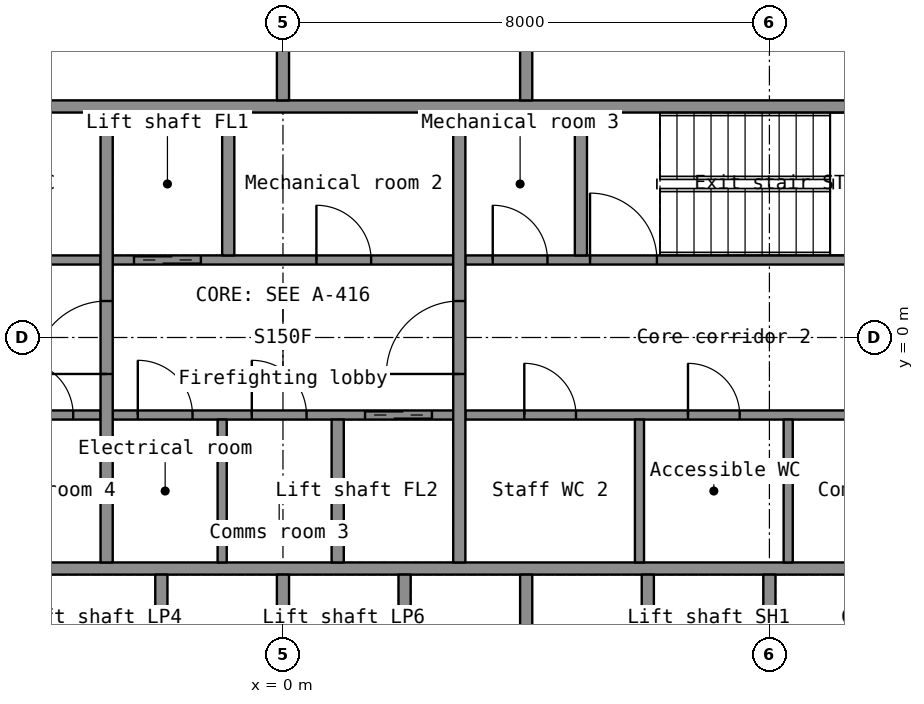
"""IFC4 building model, lengths in metres.
Left out: names, types, materials, properties, quantities, classifications, styles, units other than length and angle.
Written with IfcOpenShell. Run it as: python <this file> out.ifc"""

import sys

from ifc_helpers import new_model, si_unit, direction, frame, frame_2d, origin, place, context, subcontext, project, spatial, rectangle, extrude, element, fill, save


model = new_model("IFC4")
c1 = context("Model", 3, precision=1e-05, world=origin(), true_north=direction((0.0, 1.0)))
c2 = subcontext(c1, "Body", "Model", "MODEL_VIEW")
j1 = project(units=[si_unit("LENGTHUNIT", "METRE"), si_unit("PLANEANGLEUNIT", "RADIAN")], contexts=[c1])
p1 = place(None, origin())
s1 = spatial("IfcSite", under=j1, at=p1, CompositionType="ELEMENT")
p2 = place(p1, origin())
s2 = spatial("IfcBuilding", under=s1, at=p2, CompositionType="ELEMENT")
p3 = place(p2, frame((0.0, 0.0, 108.2)))
s3 = spatial("IfcBuildingStorey", under=s2, at=p3, CompositionType="ELEMENT", Elevation=108.2)
for number, where, z_axis, x_axis in (
    (1, (-11.5, -3.8, 0.0), (0.0, 0.0, 1.0), (1.0, 0.0, 0.0)),
    (2, (-11.5, 3.8, 0.0), (0.0, 0.0, 1.0), (1.0, 0.0, 0.0)),
):
    element("IfcWall", number, at=place(p3, frame(where, z_axis=z_axis, x_axis=x_axis)), inside=s3, PredefinedType="SHEAR", context=c2, shape_type="SweptSolid", body=[
        extrude(rectangle(XDim=23.0, YDim=0.2, at=frame_2d((11.5, 0.0))), origin(), (0.0, 0.0, 1.0), 3.3),
    ])
for number, where, z_axis, x_axis in (
    (3, (-2.0, -6.7, 0.0), (0.0, 0.0, 1.0), (0.0, 1.0, 0.0)),
    (4, (0.0, -6.7, 0.0), (0.0, 0.0, 1.0), (0.0, 1.0, 0.0)),
    (5, (2.0, -6.7, 0.0), (0.0, 0.0, 1.0), (0.0, 1.0, 0.0)),
    (6, (4.0, -6.7, 0.0), (0.0, 0.0, 1.0), (0.0, 1.0, 0.0)),
    (7, (6.0, -6.7, 0.0), (0.0, 0.0, 1.0), (0.0, 1.0, 0.0)),
    (8, (8.0, -6.7, 0.0), (0.0, 0.0, 1.0), (0.0, 1.0, 0.0)),
):
    element("IfcWall", number, at=place(p3, frame(where, z_axis=z_axis, x_axis=x_axis)), inside=s3, PredefinedType="SHEAR", context=c2, shape_type="SweptSolid", body=[
        extrude(rectangle(XDim=2.8, YDim=0.2, at=frame_2d((1.4, 0.0))), origin(), (0.0, 0.0, 1.0), 3.3),
    ])
for number, where, z_axis, x_axis in (
    (9, (0.0, 3.9, 0.0), (0.0, 0.0, 1.0), (0.0, 1.0, 0.0)),
    (10, (4.0, 3.9, 0.0), (0.0, 0.0, 1.0), (0.0, 1.0, 0.0)),
):
    element("IfcWall", number, at=place(p3, frame(where, z_axis=z_axis, x_axis=x_axis)), inside=s3, PredefinedType="PARTITIONING", context=c2, shape_type="SweptSolid", body=[
        extrude(rectangle(XDim=2.8, YDim=0.2, at=frame_2d((1.4, 0.0))), origin(), (0.0, 0.0, 1.0), 3.3),
    ])
p4 = place(p3, frame((-11.5, -1.275, 0.0), z_axis=(0.0, 0.0, 1.0), x_axis=(1.0, 0.0, 0.0)))
e11 = element("IfcWall", 11, at=p4, inside=s3, PredefinedType="SHEAR", context=c2, shape_type="SweptSolid", body=[
    extrude(rectangle(XDim=8.5, YDim=0.15, at=frame_2d((4.25, 0.0))), origin(), (0.0, 0.0, 1.0), 3.3),
])
p5 = place(p4, frame((5.35, 0.0, 0.0)))
e12 = element("IfcOpeningElement", 12, at=p5, cuts=e11, PredefinedType="OPENING", context=c2, shape_type="SweptSolid", body=[
    extrude(rectangle(XDim=1.1, YDim=2.15, at=frame_2d((0.55, 1.075))), frame((0.0, 0.085, 0.0), z_axis=(0.0, -1.0, 0.0), x_axis=(1.0, 0.0, 0.0)), (0.0, 0.0, 1.0), 0.17),
])
p6 = place(p4, frame((7.15, 0.0, 0.0)))
e13 = element("IfcOpeningElement", 13, at=p6, cuts=e11, PredefinedType="OPENING", context=c2, shape_type="SweptSolid", body=[
    extrude(rectangle(XDim=0.9, YDim=2.1, at=frame_2d((0.45, 1.05))), frame((0.0, 0.085, 0.0), z_axis=(0.0, -1.0, 0.0), x_axis=(1.0, 0.0, 0.0)), (0.0, 0.0, 1.0), 0.17),
])
p7 = place(p3, frame((-2.8, -1.275, 0.0), z_axis=(0.0, 0.0, 1.0), x_axis=(1.0, 0.0, 0.0)))
e14 = element("IfcWall", 14, at=p7, inside=s3, PredefinedType="SHEAR", context=c2, shape_type="SweptSolid", body=[
    extrude(rectangle(XDim=5.6, YDim=0.15, at=frame_2d((2.8, 0.0))), origin(), (0.0, 0.0, 1.0), 3.3),
])
p8 = place(p7, frame((4.15, 0.0, 0.0)))
e15 = element("IfcOpeningElement", 15, at=p8, cuts=e14, PredefinedType="OPENING", context=c2, shape_type="SweptSolid", body=[
    extrude(rectangle(XDim=1.1, YDim=2.2, at=frame_2d((0.55, 1.1))), frame((0.0, 0.085, 0.0), z_axis=(0.0, -1.0, 0.0), x_axis=(1.0, 0.0, 0.0)), (0.0, 0.0, 1.0), 0.17),
])
p9 = place(p7, frame((0.413, 0.0, 0.0)))
e16 = element("IfcOpeningElement", 16, at=p9, cuts=e14, PredefinedType="OPENING", context=c2, shape_type="SweptSolid", body=[
    extrude(rectangle(XDim=0.9, YDim=2.1, at=frame_2d((0.45, 1.05))), frame((0.0, 0.085, 0.0), z_axis=(0.0, -1.0, 0.0), x_axis=(1.0, 0.0, 0.0)), (0.0, 0.0, 1.0), 0.17),
])
p10 = place(p7, frame((2.288, 0.0, 0.0)))
e17 = element("IfcOpeningElement", 17, at=p10, cuts=e14, PredefinedType="OPENING", context=c2, shape_type="SweptSolid", body=[
    extrude(rectangle(XDim=0.9, YDim=2.1, at=frame_2d((0.45, 1.05))), frame((0.0, 0.085, 0.0), z_axis=(0.0, -1.0, 0.0), x_axis=(1.0, 0.0, 0.0)), (0.0, 0.0, 1.0), 0.17),
])
p11 = place(p3, frame((3.0, -1.275, 0.0), z_axis=(0.0, 0.0, 1.0), x_axis=(1.0, 0.0, 0.0)))
e18 = element("IfcWall", 18, at=p11, inside=s3, PredefinedType="PARTITIONING", context=c2, shape_type="SweptSolid", body=[
    extrude(rectangle(XDim=8.5, YDim=0.15, at=frame_2d((4.25, 0.0))), origin(), (0.0, 0.0, 1.0), 3.3),
])
p12 = place(p11, frame((0.969, 0.0, 0.0)))
e19 = element("IfcOpeningElement", 19, at=p12, cuts=e18, PredefinedType="OPENING", context=c2, shape_type="SweptSolid", body=[
    extrude(rectangle(XDim=0.85, YDim=2.1, at=frame_2d((0.425, 1.05))), frame((0.0, 0.085, 0.0), z_axis=(0.0, -1.0, 0.0), x_axis=(1.0, 0.0, 0.0)), (0.0, 0.0, 1.0), 0.17),
])
p13 = place(p11, frame((3.661, 0.0, 0.0)))
e20 = element("IfcOpeningElement", 20, at=p13, cuts=e18, PredefinedType="OPENING", context=c2, shape_type="SweptSolid", body=[
    extrude(rectangle(XDim=0.85, YDim=2.1, at=frame_2d((0.425, 1.05))), frame((0.0, 0.085, 0.0), z_axis=(0.0, -1.0, 0.0), x_axis=(1.0, 0.0, 0.0)), (0.0, 0.0, 1.0), 0.17),
])
p14 = place(p11, frame((6.492, 0.0, 0.0)))
e21 = element("IfcOpeningElement", 21, at=p14, cuts=e18, PredefinedType="OPENING", context=c2, shape_type="SweptSolid", body=[
    extrude(rectangle(XDim=0.9, YDim=2.1, at=frame_2d((0.45, 1.05))), frame((0.0, 0.085, 0.0), z_axis=(0.0, -1.0, 0.0), x_axis=(1.0, 0.0, 0.0)), (0.0, 0.0, 1.0), 0.17),
])
p15 = place(p3, frame((-11.5, 1.275, 0.0), z_axis=(0.0, 0.0, 1.0), x_axis=(1.0, 0.0, 0.0)))
e22 = element("IfcWall", 22, at=p15, inside=s3, PredefinedType="PARTITIONING", context=c2, shape_type="SweptSolid", body=[
    extrude(rectangle(XDim=8.5, YDim=0.15, at=frame_2d((4.25, 0.0))), origin(), (0.0, 0.0, 1.0), 3.3),
])
p16 = place(p15, frame((0.616, 0.0, 0.0)))
e23 = element("IfcOpeningElement", 23, at=p16, cuts=e22, PredefinedType="OPENING", context=c2, shape_type="SweptSolid", body=[
    extrude(rectangle(XDim=0.9, YDim=2.1, at=frame_2d((0.45, 1.05))), frame((0.0, 0.085, 0.0), z_axis=(0.0, -1.0, 0.0), x_axis=(1.0, 0.0, 0.0)), (0.0, 0.0, 1.0), 0.17),
])
p17 = place(p15, frame((3.374, 0.0, 0.0)))
e24 = element("IfcOpeningElement", 24, at=p17, cuts=e22, PredefinedType="OPENING", context=c2, shape_type="SweptSolid", body=[
    extrude(rectangle(XDim=0.85, YDim=2.1, at=frame_2d((0.425, 1.05))), frame((0.0, 0.085, 0.0), z_axis=(0.0, -1.0, 0.0), x_axis=(1.0, 0.0, 0.0)), (0.0, 0.0, 1.0), 0.17),
])
p18 = place(p15, frame((6.558, 0.0, 0.0)))
e25 = element("IfcOpeningElement", 25, at=p18, cuts=e22, PredefinedType="OPENING", context=c2, shape_type="SweptSolid", body=[
    extrude(rectangle(XDim=0.85, YDim=2.1, at=frame_2d((0.425, 1.05))), frame((0.0, 0.085, 0.0), z_axis=(0.0, -1.0, 0.0), x_axis=(1.0, 0.0, 0.0)), (0.0, 0.0, 1.0), 0.17),
])
p19 = place(p3, frame((-2.8, 1.275, 0.0), z_axis=(0.0, 0.0, 1.0), x_axis=(1.0, 0.0, 0.0)))
e26 = element("IfcWall", 26, at=p19, inside=s3, PredefinedType="SHEAR", context=c2, shape_type="SweptSolid", body=[
    extrude(rectangle(XDim=5.6, YDim=0.15, at=frame_2d((2.8, 0.0))), origin(), (0.0, 0.0, 1.0), 3.3),
])
p20 = place(p19, frame((0.35, 0.0, 0.0)))
e27 = element("IfcOpeningElement", 27, at=p20, cuts=e26, PredefinedType="OPENING", context=c2, shape_type="SweptSolid", body=[
    extrude(rectangle(XDim=1.1, YDim=2.2, at=frame_2d((0.55, 1.1))), frame((0.0, 0.085, 0.0), z_axis=(0.0, -1.0, 0.0), x_axis=(1.0, 0.0, 0.0)), (0.0, 0.0, 1.0), 0.17),
])
p21 = place(p19, frame((3.35, 0.0, 0.0)))
e28 = element("IfcOpeningElement", 28, at=p21, cuts=e26, PredefinedType="OPENING", context=c2, shape_type="SweptSolid", body=[
    extrude(rectangle(XDim=0.9, YDim=2.1, at=frame_2d((0.45, 1.05))), frame((0.0, 0.085, 0.0), z_axis=(0.0, -1.0, 0.0), x_axis=(1.0, 0.0, 0.0)), (0.0, 0.0, 1.0), 0.17),
])
p22 = place(p3, frame((3.0, 1.275, 0.0), z_axis=(0.0, 0.0, 1.0), x_axis=(1.0, 0.0, 0.0)))
e29 = element("IfcWall", 29, at=p22, inside=s3, PredefinedType="SHEAR", context=c2, shape_type="SweptSolid", body=[
    extrude(rectangle(XDim=8.5, YDim=0.15, at=frame_2d((4.25, 0.0))), origin(), (0.0, 0.0, 1.0), 3.3),
])
p23 = place(p22, frame((2.05, 0.0, 0.0)))
e30 = element("IfcOpeningElement", 30, at=p23, cuts=e29, PredefinedType="OPENING", context=c2, shape_type="SweptSolid", body=[
    extrude(rectangle(XDim=1.1, YDim=2.15, at=frame_2d((0.55, 1.075))), frame((0.0, 0.085, 0.0), z_axis=(0.0, -1.0, 0.0), x_axis=(1.0, 0.0, 0.0)), (0.0, 0.0, 1.0), 0.17),
])
p24 = place(p22, frame((0.45, 0.0, 0.0)))
e31 = element("IfcOpeningElement", 31, at=p24, cuts=e29, PredefinedType="OPENING", context=c2, shape_type="SweptSolid", body=[
    extrude(rectangle(XDim=0.9, YDim=2.1, at=frame_2d((0.45, 1.05))), frame((0.0, 0.085, 0.0), z_axis=(0.0, -1.0, 0.0), x_axis=(1.0, 0.0, 0.0)), (0.0, 0.0, 1.0), 0.17),
])
p25 = place(p3, frame((-2.9, -3.7, 0.0), z_axis=(0.0, 0.0, 1.0), x_axis=(0.0, 1.0, 0.0)))
e32 = element("IfcWall", 32, at=p25, inside=s3, PredefinedType="SHEAR", context=c2, shape_type="SweptSolid", body=[
    extrude(rectangle(XDim=7.4, YDim=0.2, at=frame_2d((3.7, 0.0))), origin(), (0.0, 0.0, 1.0), 3.3),
])
p26 = place(p25, frame((3.1, 0.0, 0.0)))
e33 = element("IfcOpeningElement", 33, at=p26, cuts=e32, PredefinedType="OPENING", context=c2, shape_type="SweptSolid", body=[
    extrude(rectangle(XDim=1.2, YDim=2.2, at=frame_2d((0.6, 1.1))), frame((0.0, 0.11, 0.0), z_axis=(0.0, -1.0, 0.0), x_axis=(1.0, 0.0, 0.0)), (0.0, 0.0, 1.0), 0.22),
])
p27 = place(p3, frame((2.9, -3.7, 0.0), z_axis=(0.0, 0.0, 1.0), x_axis=(0.0, 1.0, 0.0)))
e34 = element("IfcWall", 34, at=p27, inside=s3, PredefinedType="SHEAR", context=c2, shape_type="SweptSolid", body=[
    extrude(rectangle(XDim=7.4, YDim=0.2, at=frame_2d((3.7, 0.0))), origin(), (0.0, 0.0, 1.0), 3.3),
])
p28 = place(p27, frame((3.1, 0.0, 0.0)))
e35 = element("IfcOpeningElement", 35, at=p28, cuts=e34, PredefinedType="OPENING", context=c2, shape_type="SweptSolid", body=[
    extrude(rectangle(XDim=1.2, YDim=2.2, at=frame_2d((0.6, 1.1))), frame((0.0, 0.11, 0.0), z_axis=(0.0, -1.0, 0.0), x_axis=(1.0, 0.0, 0.0)), (0.0, 0.0, 1.0), 0.22),
])
for number, where, z_axis, x_axis in (
    (36, (-0.9, 1.35, 0.0), (0.0, 0.0, 1.0), (0.0, 1.0, 0.0)),
    (37, (0.9, -3.7, 0.0), (0.0, 0.0, 1.0), (0.0, 1.0, 0.0)),
    (38, (4.9, 1.35, 0.0), (0.0, 0.0, 1.0), (0.0, 1.0, 0.0)),
):
    element("IfcWall", number, at=place(p3, frame(where, z_axis=z_axis, x_axis=x_axis)), inside=s3, PredefinedType="SHEAR", context=c2, shape_type="SweptSolid", body=[
        extrude(rectangle(XDim=2.35, YDim=0.2, at=frame_2d((1.175, 0.0))), origin(), (0.0, 0.0, 1.0), 3.3),
    ])
for number, where, z_axis, x_axis in (
    (39, (5.863, -3.7, 0.0), (0.0, 0.0, 1.0), (0.0, 1.0, 0.0)),
    (40, (8.309, -3.7, 0.0), (0.0, 0.0, 1.0), (0.0, 1.0, 0.0)),
    (41, (-1.0, -3.7, 0.0), (0.0, 0.0, 1.0), (0.0, 1.0, 0.0)),
):
    element("IfcWall", number, at=place(p3, frame(where, z_axis=z_axis, x_axis=x_axis)), inside=s3, PredefinedType="PARTITIONING", context=c2, shape_type="SweptSolid", body=[
        extrude(rectangle(XDim=2.35, YDim=0.15, at=frame_2d((1.175, 0.0))), origin(), (0.0, 0.0, 1.0), 3.3),
    ])
p29 = place(p26, origin())
e42 = element("IfcDoor", 42, at=p29, inside=s3, OperationType="SINGLE_SWING_LEFT", PredefinedType="DOOR", context=c2, shape_type="SweptSolid", body=[
    extrude(rectangle(XDim=1.2, YDim=2.2, at=frame_2d((0.6, 1.1))), frame((0.0, 0.025, 0.0), z_axis=(0.0, -1.0, 0.0), x_axis=(1.0, 0.0, 0.0)), (0.0, 0.0, 1.0), 0.05),
])
fill(e33, e42)
p30 = place(p28, origin())
e43 = element("IfcDoor", 43, at=p30, inside=s3, OperationType="SINGLE_SWING_LEFT", PredefinedType="DOOR", context=c2, shape_type="SweptSolid", body=[
    extrude(rectangle(XDim=1.2, YDim=2.2, at=frame_2d((0.6, 1.1))), frame((0.0, 0.025, 0.0), z_axis=(0.0, -1.0, 0.0), x_axis=(1.0, 0.0, 0.0)), (0.0, 0.0, 1.0), 0.05),
])
fill(e35, e43)
p31 = place(p20, origin())
e44 = element("IfcDoor", 44, at=p31, inside=s3, OperationType="DOUBLE_DOOR_SLIDING", PredefinedType="DOOR", context=c2, shape_type="SweptSolid", body=[
    extrude(rectangle(XDim=1.1, YDim=2.2, at=frame_2d((0.55, 1.1))), frame((0.0, 0.025, 0.0), z_axis=(0.0, -1.0, 0.0), x_axis=(1.0, 0.0, 0.0)), (0.0, 0.0, 1.0), 0.05),
])
fill(e27, e44)
p32 = place(p8, origin())
e45 = element("IfcDoor", 45, at=p32, inside=s3, OperationType="DOUBLE_DOOR_SLIDING", PredefinedType="DOOR", context=c2, shape_type="SweptSolid", body=[
    extrude(rectangle(XDim=1.1, YDim=2.2, at=frame_2d((0.55, 1.1))), frame((0.0, 0.025, 0.0), z_axis=(0.0, -1.0, 0.0), x_axis=(1.0, 0.0, 0.0)), (0.0, 0.0, 1.0), 0.05),
])
fill(e15, e45)
p33 = place(p23, origin())
e46 = element("IfcDoor", 46, at=p33, inside=s3, OperationType="SINGLE_SWING_LEFT", PredefinedType="DOOR", context=c2, shape_type="SweptSolid", body=[
    extrude(rectangle(XDim=1.1, YDim=2.15, at=frame_2d((0.55, 1.075))), frame((0.0, 0.025, 0.0), z_axis=(0.0, -1.0, 0.0), x_axis=(1.0, 0.0, 0.0)), (0.0, 0.0, 1.0), 0.05),
])
fill(e30, e46)
p34 = place(p12, origin())
e47 = element("IfcDoor", 47, at=p34, inside=s3, OperationType="SINGLE_SWING_LEFT", PredefinedType="DOOR", context=c2, shape_type="SweptSolid", body=[
    extrude(rectangle(XDim=0.85, YDim=2.1, at=frame_2d((0.425, 1.05))), frame((0.0, 0.025, 0.0), z_axis=(0.0, -1.0, 0.0), x_axis=(1.0, 0.0, 0.0)), (0.0, 0.0, 1.0), 0.05),
])
fill(e19, e47)
p35 = place(p13, origin())
e48 = element("IfcDoor", 48, at=p35, inside=s3, OperationType="SINGLE_SWING_LEFT", PredefinedType="DOOR", context=c2, shape_type="SweptSolid", body=[
    extrude(rectangle(XDim=0.85, YDim=2.1, at=frame_2d((0.425, 1.05))), frame((0.0, 0.025, 0.0), z_axis=(0.0, -1.0, 0.0), x_axis=(1.0, 0.0, 0.0)), (0.0, 0.0, 1.0), 0.05),
])
fill(e20, e48)
p36 = place(p21, origin())
e49 = element("IfcDoor", 49, at=p36, inside=s3, OperationType="SINGLE_SWING_LEFT", PredefinedType="DOOR", context=c2, shape_type="SweptSolid", body=[
    extrude(rectangle(XDim=0.9, YDim=2.1, at=frame_2d((0.45, 1.05))), frame((0.0, 0.025, 0.0), z_axis=(0.0, -1.0, 0.0), x_axis=(1.0, 0.0, 0.0)), (0.0, 0.0, 1.0), 0.05),
])
fill(e28, e49)
p37 = place(p9, origin())
e50 = element("IfcDoor", 50, at=p37, inside=s3, OperationType="SINGLE_SWING_LEFT", PredefinedType="DOOR", context=c2, shape_type="SweptSolid", body=[
    extrude(rectangle(XDim=0.9, YDim=2.1, at=frame_2d((0.45, 1.05))), frame((0.0, 0.025, 0.0), z_axis=(0.0, -1.0, 0.0), x_axis=(1.0, 0.0, 0.0)), (0.0, 0.0, 1.0), 0.05),
])
fill(e16, e50)
p38 = place(p10, origin())
e51 = element("IfcDoor", 51, at=p38, inside=s3, OperationType="SINGLE_SWING_LEFT", PredefinedType="DOOR", context=c2, shape_type="SweptSolid", body=[
    extrude(rectangle(XDim=0.9, YDim=2.1, at=frame_2d((0.45, 1.05))), frame((0.0, 0.025, 0.0), z_axis=(0.0, -1.0, 0.0), x_axis=(1.0, 0.0, 0.0)), (0.0, 0.0, 1.0), 0.05),
])
fill(e17, e51)
p39 = place(p24, origin())
e52 = element("IfcDoor", 52, at=p39, inside=s3, OperationType="SINGLE_SWING_LEFT", PredefinedType="DOOR", context=c2, shape_type="SweptSolid", body=[
    extrude(rectangle(XDim=0.9, YDim=2.1, at=frame_2d((0.45, 1.05))), frame((0.0, 0.025, 0.0), z_axis=(0.0, -1.0, 0.0), x_axis=(1.0, 0.0, 0.0)), (0.0, 0.0, 1.0), 0.05),
])
fill(e31, e52)
p40 = place(p6, origin())
e53 = element("IfcDoor", 53, at=p40, inside=s3, OperationType="SINGLE_SWING_LEFT", PredefinedType="DOOR", context=c2, shape_type="SweptSolid", body=[
    extrude(rectangle(XDim=0.9, YDim=2.1, at=frame_2d((0.45, 1.05))), frame((0.0, 0.025, 0.0), z_axis=(0.0, -1.0, 0.0), x_axis=(1.0, 0.0, 0.0)), (0.0, 0.0, 1.0), 0.05),
])
fill(e13, e53)
save(model, sys.argv[1])
